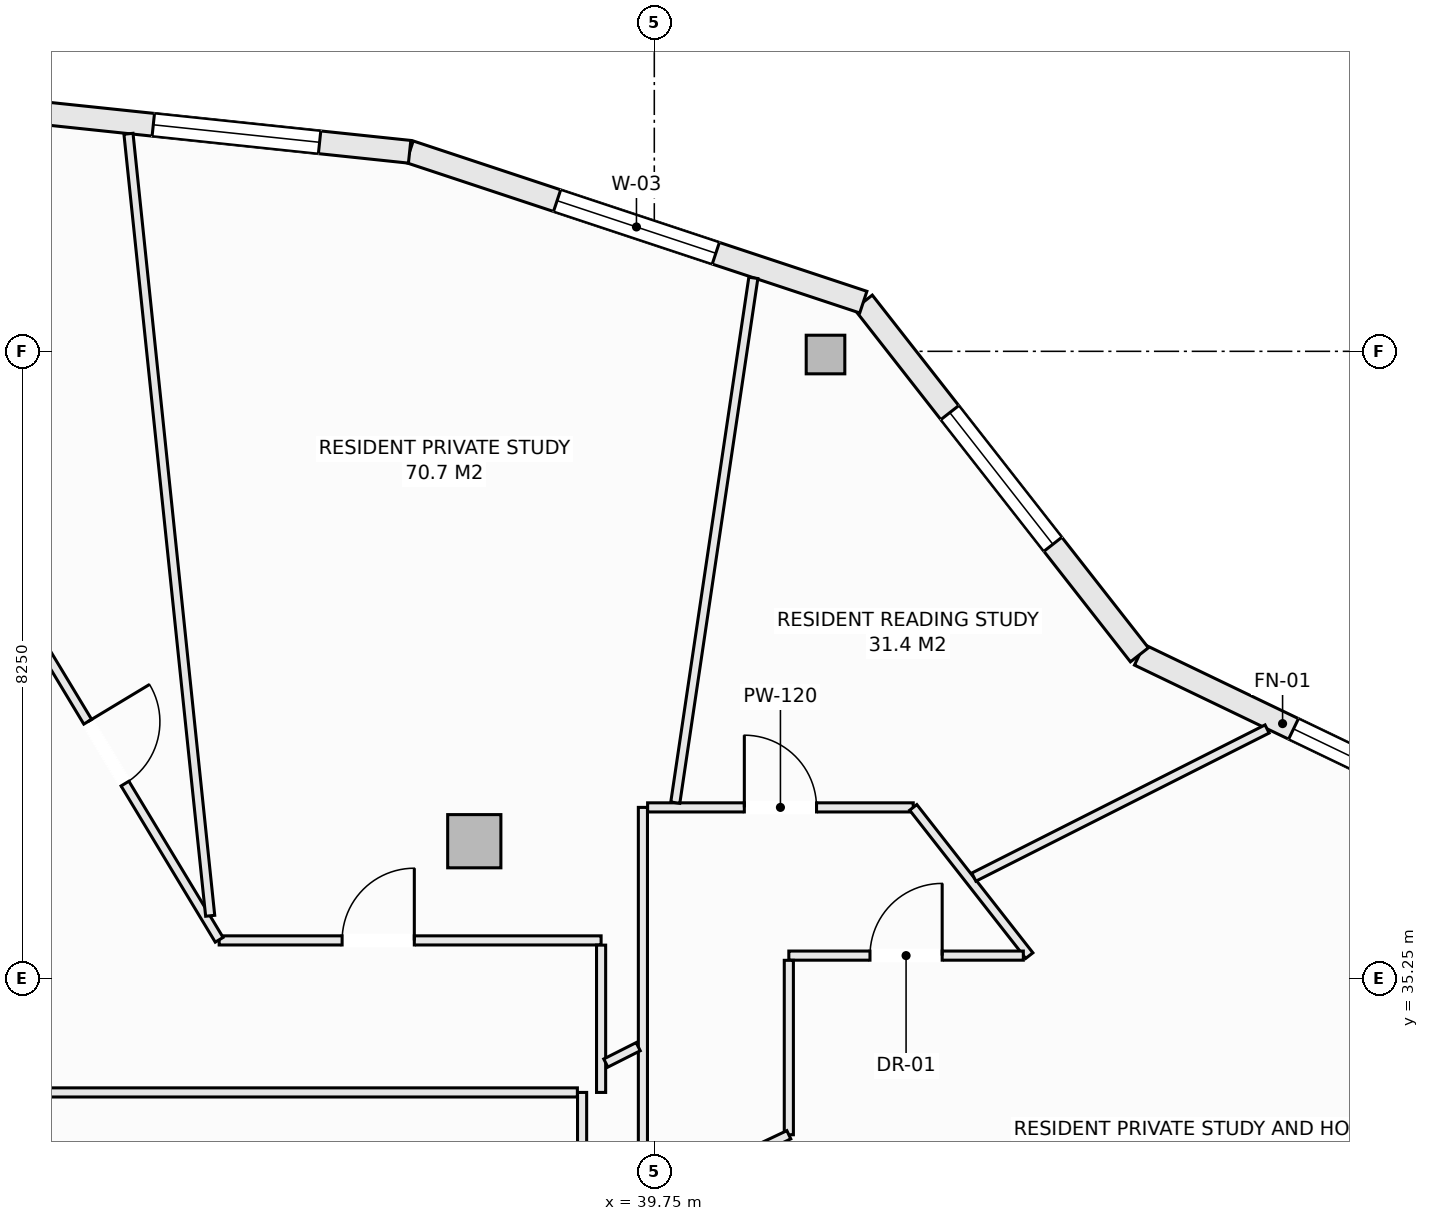
"""IFC4 building model, lengths in metres.
Left out: names, types, materials, properties, quantities, classifications, styles, units other than length and angle.
Written with IfcOpenShell. Run it as: python <this file> out.ifc"""

import sys

from ifc_helpers import new_model, si_unit, direction, frame, frame_2d, origin, origin_2d, place, context, subcontext, project, spatial, rectangle, hollow_rectangle, extrude, element, fill, save


model = new_model("IFC4")
c1 = context("Model", 3, precision=1e-05, world=origin(), true_north=direction((0.0, 1.0)))
c2 = subcontext(c1, "Body", "Model", "MODEL_VIEW")
j1 = project(units=[si_unit("LENGTHUNIT", "METRE"), si_unit("PLANEANGLEUNIT", "RADIAN")], contexts=[c1])
p1 = place(None, origin())
s1 = spatial("IfcSite", under=j1, at=p1, CompositionType="ELEMENT")
p2 = place(p1, origin())
s2 = spatial("IfcBuilding", under=s1, at=p2, CompositionType="ELEMENT")
p3 = place(p2, frame((0.0, 0.0, 229.4)))
s3 = spatial("IfcBuildingStorey", under=s2, at=p3, CompositionType="ELEMENT", Elevation=229.4)
p4 = place(p3, frame((42.003, 43.458, -0.27), z_axis=(0.0, 0.0, 1.0), x_axis=(1.0, 0.0, 0.0)))
e1 = element("IfcColumn", 1, at=p4, inside=s3, PredefinedType="COLUMN", context=c2, shape_type="SweptSolid", body=[
    extrude(hollow_rectangle(XDim=0.508, YDim=0.508, WallThickness=0.019, at=origin_2d()), origin(), (0.0, 0.0, 1.0), 3.3),
])
p5 = place(p3, frame((37.382, 37.055, -0.27), z_axis=(0.0, 0.0, 1.0), x_axis=(1.0, 0.0, 0.0)))
e2 = element("IfcColumn", 2, at=p5, inside=s3, PredefinedType="COLUMN", context=c2, shape_type="SweptSolid", body=[
    extrude(rectangle(XDim=0.7, YDim=0.7, at=origin_2d()), origin(), (0.0, 0.0, 1.0), 3.3),
])
p6 = place(p3, frame((46.133, 39.507, 0.0), z_axis=(0.0, 0.0, 1.0), x_axis=(0.901348331142, -0.433094892545, 0.0)))
e3 = element("IfcWall", 3, at=p6, inside=s3, PredefinedType="SOLIDWALL", context=c2, shape_type="SweptSolid", body=[
    extrude(rectangle(XDim=6.021, YDim=0.3, at=frame_2d((3.01, 0.0))), origin(), (0.0, 0.0, 1.0), 2.605),
])
p7 = place(p6, frame((2.25, 0.0, 0.72)))
e4 = element("IfcOpeningElement", 4, at=p7, cuts=e3, PredefinedType="OPENING", context=c2, shape_type="SweptSolid", body=[
    extrude(rectangle(XDim=2.2, YDim=1.65, at=frame_2d((1.1, 0.825))), frame((0.0, 0.16, 0.0), z_axis=(0.0, -1.0, 0.0), x_axis=(1.0, 0.0, 0.0)), (0.0, 0.0, 1.0), 0.32),
])
p8 = place(p3, frame((42.5, 44.147, 0.0), z_axis=(0.0, 0.0, 1.0), x_axis=(0.616450126935, -0.787393955401, 0.0)))
e5 = element("IfcWall", 5, at=p8, inside=s3, PredefinedType="SOLIDWALL", context=c2, shape_type="SweptSolid", body=[
    extrude(rectangle(XDim=5.893, YDim=0.3, at=frame_2d((2.946, 0.0))), origin(), (0.0, 0.0, 1.0), 2.605),
])
p9 = place(p8, frame((1.846, 0.0, 0.72)))
e6 = element("IfcOpeningElement", 6, at=p9, cuts=e5, PredefinedType="OPENING", context=c2, shape_type="SweptSolid", body=[
    extrude(rectangle(XDim=2.2, YDim=1.65, at=frame_2d((1.1, 0.825))), frame((0.0, 0.16, 0.0), z_axis=(0.0, -1.0, 0.0), x_axis=(1.0, 0.0, 0.0)), (0.0, 0.0, 1.0), 0.32),
])
p10 = place(p3, frame((36.531, 46.125, 0.0), z_axis=(0.0, 0.0, 1.0), x_axis=(0.949240877604, -0.314550085495, 0.0)))
e7 = element("IfcWall", 7, at=p10, inside=s3, PredefinedType="SOLIDWALL", context=c2, shape_type="SweptSolid", body=[
    extrude(rectangle(XDim=6.288, YDim=0.3, at=frame_2d((3.144, 0.0))), origin(), (0.0, 0.0, 1.0), 2.605),
])
p11 = place(p10, frame((2.044, 0.0, 0.72)))
e8 = element("IfcOpeningElement", 8, at=p11, cuts=e7, PredefinedType="OPENING", context=c2, shape_type="SweptSolid", body=[
    extrude(rectangle(XDim=2.2, YDim=1.65, at=frame_2d((1.1, 0.825))), frame((0.0, 0.16, 0.0), z_axis=(0.0, -1.0, 0.0), x_axis=(1.0, 0.0, 0.0)), (0.0, 0.0, 1.0), 0.32),
])
p12 = place(p3, frame((30.125, 46.8, 0.0), z_axis=(0.0, 0.0, 1.0), x_axis=(0.994497142298, -0.104763705363, 0.0)))
e9 = element("IfcWall", 9, at=p12, inside=s3, PredefinedType="SOLIDWALL", context=c2, shape_type="SweptSolid", body=[
    extrude(rectangle(XDim=6.441, YDim=0.3, at=frame_2d((3.221, 0.0))), origin(), (0.0, 0.0, 1.0), 2.605),
])
p13 = place(p12, frame((3.05, 0.0, 0.72)))
e10 = element("IfcOpeningElement", 10, at=p13, cuts=e9, PredefinedType="OPENING", context=c2, shape_type="SweptSolid", body=[
    extrude(rectangle(XDim=2.2, YDim=1.65, at=frame_2d((1.1, 0.825))), frame((0.0, 0.16, 0.0), z_axis=(0.0, -1.0, 0.0), x_axis=(1.0, 0.0, 0.0)), (0.0, 0.0, 1.0), 0.32),
])
p14 = place(p3, frame((38.8, 31.12, 0.0), z_axis=(0.0, 0.0, 1.0), x_axis=(0.0, 1.0, 0.0)))
e11 = element("IfcWall", 11, at=p14, inside=s3, PredefinedType="PARTITIONING", context=c2, shape_type="SweptSolid", body=[
    extrude(rectangle(XDim=2.63, YDim=0.12, at=frame_2d((1.315, 0.0))), origin(), (0.0, 0.0, 1.0), 3.03),
])
p15 = place(p3, frame((30.062, 33.75, 0.0), z_axis=(0.0, 0.0, 1.0), x_axis=(1.0, 0.0, 0.0)))
e12 = element("IfcWall", 12, at=p15, inside=s3, PredefinedType="PARTITIONING", context=c2, shape_type="SweptSolid", body=[
    extrude(rectangle(XDim=8.676, YDim=0.12, at=frame_2d((4.338, 0.0))), origin(), (0.0, 0.0, 1.0), 3.03),
])
p16 = place(p3, frame((34.025, 35.75, 0.0), z_axis=(0.0, 0.0, 1.0), x_axis=(1.0, 0.0, 0.0)))
e13 = element("IfcWall", 13, at=p16, inside=s3, PredefinedType="PARTITIONING", context=c2, shape_type="SweptSolid", body=[
    extrude(rectangle(XDim=5.025, YDim=0.12, at=frame_2d((2.513, 0.0))), origin(), (0.0, 0.0, 1.0), 2.478),
])
p17 = place(p16, frame((1.617, 0.0, 0.0)))
e14 = element("IfcOpeningElement", 14, at=p17, cuts=e13, PredefinedType="OPENING", context=c2, shape_type="SweptSolid", body=[
    extrude(rectangle(XDim=0.95, YDim=2.1, at=frame_2d((0.475, 1.05))), frame((0.0, 0.07, 0.0), z_axis=(0.0, -1.0, 0.0), x_axis=(1.0, 0.0, 0.0)), (0.0, 0.0, 1.0), 0.14),
])
p18 = place(p3, frame((31.635, 39.723, 0.0), z_axis=(0.0, 0.0, 1.0), x_axis=(0.516340331217, -0.856383478565, 0.0)))
e15 = element("IfcWall", 15, at=p18, inside=s3, PredefinedType="PARTITIONING", context=c2, shape_type="SweptSolid", body=[
    extrude(rectangle(XDim=4.629, YDim=0.12, at=frame_2d((2.315, 0.0))), origin(), (0.0, 0.0, 1.0), 3.03),
])
p19 = place(p18, frame((1.28, 0.0, 0.0)))
e16 = element("IfcOpeningElement", 16, at=p19, cuts=e15, PredefinedType="OPENING", context=c2, shape_type="SweptSolid", body=[
    extrude(rectangle(XDim=0.95, YDim=2.1, at=frame_2d((0.475, 1.05))), frame((0.0, 0.07, 0.0), z_axis=(0.0, -1.0, 0.0), x_axis=(1.0, 0.0, 0.0)), (0.0, 0.0, 1.0), 0.14),
])
p20 = place(p3, frame((39.05, 33.75, 0.0), z_axis=(0.0, 0.0, 1.0), x_axis=(0.0, 1.0, 0.0)))
e17 = element("IfcWall", 17, at=p20, inside=s3, PredefinedType="PARTITIONING", context=c2, shape_type="SweptSolid", body=[
    extrude(rectangle(XDim=1.938, YDim=0.12, at=frame_2d((0.969, 0.0))), origin(), (0.0, 0.0, 1.0), 3.03),
])
p21 = place(p3, frame((39.6, 31.182, 0.0), z_axis=(0.0, 0.0, 1.0), x_axis=(0.0, 1.0, 0.0)))
e18 = element("IfcWall", 18, at=p21, inside=s3, PredefinedType="PARTITIONING", context=c2, shape_type="SweptSolid", body=[
    extrude(rectangle(XDim=6.318, YDim=0.12, at=frame_2d((3.159, 0.0))), origin(), (0.0, 0.0, 1.0), 3.03),
])
p22 = place(p3, frame((39.662, 37.5, 0.0), z_axis=(0.0, 0.0, 1.0), x_axis=(1.0, 0.0, 0.0)))
e19 = element("IfcWall", 19, at=p22, inside=s3, PredefinedType="PARTITIONING", context=c2, shape_type="SweptSolid", body=[
    extrude(rectangle(XDim=3.495, YDim=0.12, at=frame_2d((1.748, 0.0))), origin(), (0.0, 0.0, 1.0), 2.77),
])
p23 = place(p22, frame((1.272, 0.0, 0.0)))
e20 = element("IfcOpeningElement", 20, at=p23, cuts=e19, PredefinedType="OPENING", context=c2, shape_type="SweptSolid", body=[
    extrude(rectangle(XDim=0.95, YDim=2.1, at=frame_2d((0.475, 1.05))), frame((0.0, 0.07, 0.0), z_axis=(0.0, -1.0, 0.0), x_axis=(1.0, 0.0, 0.0)), (0.0, 0.0, 1.0), 0.14),
])
p24 = place(p3, frame((43.157, 37.5, 0.0), z_axis=(0.0, 0.0, 1.0), x_axis=(0.616571357052, -0.78729902938, 0.0)))
e21 = element("IfcWall", 21, at=p24, inside=s3, PredefinedType="PARTITIONING", context=c2, shape_type="SweptSolid", body=[
    extrude(rectangle(XDim=2.477, YDim=0.12, at=frame_2d((1.238, 0.0))), origin(), (0.0, 0.0, 1.0), 3.03),
])
p25 = place(p3, frame((41.52, 35.55, 0.0), z_axis=(0.0, 0.0, 1.0), x_axis=(1.0, 0.0, 0.0)))
e22 = element("IfcWall", 22, at=p25, inside=s3, PredefinedType="PARTITIONING", context=c2, shape_type="SweptSolid", body=[
    extrude(rectangle(XDim=3.085, YDim=0.12, at=frame_2d((1.542, 0.0))), origin(), (0.0, 0.0, 1.0), 3.03),
])
p26 = place(p25, frame((1.068, 0.0, 0.0)))
e23 = element("IfcOpeningElement", 23, at=p26, cuts=e22, PredefinedType="OPENING", context=c2, shape_type="SweptSolid", body=[
    extrude(rectangle(XDim=0.95, YDim=2.1, at=frame_2d((0.475, 1.05))), frame((0.0, 0.07, 0.0), z_axis=(0.0, -1.0, 0.0), x_axis=(1.0, 0.0, 0.0)), (0.0, 0.0, 1.0), 0.14),
])
p27 = place(p3, frame((41.52, 33.193, 0.0), z_axis=(0.0, 0.0, 1.0), x_axis=(0.0, 1.0, 0.0)))
e24 = element("IfcWall", 24, at=p27, inside=s3, PredefinedType="PARTITIONING", context=c2, shape_type="SweptSolid", body=[
    extrude(rectangle(XDim=2.295, YDim=0.12, at=frame_2d((1.147, 0.0))), origin(), (0.0, 0.0, 1.0), 3.03),
])
p28 = place(p3, frame((40.986, 32.94, 0.0), z_axis=(0.0, 0.0, 1.0), x_axis=(0.90356951601, 0.428441512621, 0.0)))
e25 = element("IfcWall", 25, at=p28, inside=s3, PredefinedType="PARTITIONING", context=c2, shape_type="SweptSolid", body=[
    extrude(rectangle(XDim=0.591, YDim=0.12, at=frame_2d((0.295, 0.0))), origin(), (0.0, 0.0, 1.0), 3.03),
])
p29 = place(p3, frame((39.112, 34.137, 0.0), z_axis=(0.0, 0.0, 1.0), x_axis=(0.892681104984, 0.450688855869, 0.0)))
e26 = element("IfcWall", 26, at=p29, inside=s3, PredefinedType="PARTITIONING", context=c2, shape_type="SweptSolid", body=[
    extrude(rectangle(XDim=0.477, YDim=0.12, at=frame_2d((0.239, 0.0))), origin(), (0.0, 0.0, 1.0), 3.03),
])
p30 = place(p3, frame((43.954, 36.583, 0.0), z_axis=(0.0, 0.0, 1.0), x_axis=(0.892589792595, 0.450869673139, 0.0)))
e27 = element("IfcWall", 27, at=p30, inside=s3, PredefinedType="PARTITIONING", context=c2, shape_type="SweptSolid", body=[
    extrude(rectangle(XDim=4.323, YDim=0.12, at=frame_2d((2.161, 0.0))), origin(), (0.0, 0.0, 1.0), 3.03),
])
p31 = place(p3, frame((40.026, 37.562, 0.0), z_axis=(0.0, 0.0, 1.0), x_axis=(0.147138038827, 0.989115967685, 0.0)))
e28 = element("IfcWall", 28, at=p31, inside=s3, PredefinedType="PARTITIONING", context=c2, shape_type="SweptSolid", body=[
    extrude(rectangle(XDim=6.98, YDim=0.12, at=frame_2d((3.49, 0.0))), origin(), (0.0, 0.0, 1.0), 2.478),
])
p32 = place(p3, frame((32.832, 46.362, 0.0), z_axis=(0.0, 0.0, 1.0), x_axis=(0.103942686354, -0.994583288595, 0.0)))
e29 = element("IfcWall", 29, at=p32, inside=s3, PredefinedType="PARTITIONING", context=c2, shape_type="SweptSolid", body=[
    extrude(rectangle(XDim=10.344, YDim=0.12, at=frame_2d((5.172, 0.0))), origin(), (0.0, 0.0, 1.0), 2.77),
])
p33 = place(p7, origin())
e30 = element("IfcWindow", 30, at=p33, inside=s3, PartitioningType="SINGLE_PANEL", PredefinedType="WINDOW", context=c2, shape_type="SweptSolid", body=[
    extrude(rectangle(XDim=2.2, YDim=1.65, at=frame_2d((1.1, 0.825))), frame((0.0, 0.03, 0.0), z_axis=(0.0, -1.0, 0.0), x_axis=(1.0, 0.0, 0.0)), (0.0, 0.0, 1.0), 0.06),
])
fill(e4, e30)
p34 = place(p9, origin())
e31 = element("IfcWindow", 31, at=p34, inside=s3, PartitioningType="SINGLE_PANEL", PredefinedType="WINDOW", context=c2, shape_type="SweptSolid", body=[
    extrude(rectangle(XDim=2.2, YDim=1.65, at=frame_2d((1.1, 0.825))), frame((0.0, 0.03, 0.0), z_axis=(0.0, -1.0, 0.0), x_axis=(1.0, 0.0, 0.0)), (0.0, 0.0, 1.0), 0.06),
])
fill(e6, e31)
p35 = place(p11, origin())
e32 = element("IfcWindow", 32, at=p35, inside=s3, PartitioningType="SINGLE_PANEL", PredefinedType="WINDOW", context=c2, shape_type="SweptSolid", body=[
    extrude(rectangle(XDim=2.2, YDim=1.65, at=frame_2d((1.1, 0.825))), frame((0.0, 0.03, 0.0), z_axis=(0.0, -1.0, 0.0), x_axis=(1.0, 0.0, 0.0)), (0.0, 0.0, 1.0), 0.06),
])
fill(e8, e32)
p36 = place(p13, origin())
e33 = element("IfcWindow", 33, at=p36, inside=s3, PartitioningType="SINGLE_PANEL", PredefinedType="WINDOW", context=c2, shape_type="SweptSolid", body=[
    extrude(rectangle(XDim=2.2, YDim=1.65, at=frame_2d((1.1, 0.825))), frame((0.0, 0.03, 0.0), z_axis=(0.0, -1.0, 0.0), x_axis=(1.0, 0.0, 0.0)), (0.0, 0.0, 1.0), 0.06),
])
fill(e10, e33)
p37 = place(p26, origin())
e34 = element("IfcDoor", 34, at=p37, inside=s3, OperationType="SINGLE_SWING_RIGHT", PredefinedType="DOOR", context=c2, shape_type="SweptSolid", body=[
    extrude(rectangle(XDim=0.95, YDim=2.1, at=frame_2d((0.475, 1.05))), frame((0.0, 0.025, 0.0), z_axis=(0.0, -1.0, 0.0), x_axis=(1.0, 0.0, 0.0)), (0.0, 0.0, 1.0), 0.05),
])
fill(e23, e34)
p38 = place(p23, origin())
e35 = element("IfcDoor", 35, at=p38, inside=s3, OperationType="SINGLE_SWING_LEFT", PredefinedType="DOOR", context=c2, shape_type="SweptSolid", body=[
    extrude(rectangle(XDim=0.95, YDim=2.1, at=frame_2d((0.475, 1.05))), frame((0.0, 0.025, 0.0), z_axis=(0.0, -1.0, 0.0), x_axis=(1.0, 0.0, 0.0)), (0.0, 0.0, 1.0), 0.05),
])
fill(e20, e35)
p39 = place(p17, origin())
e36 = element("IfcDoor", 36, at=p39, inside=s3, OperationType="SINGLE_SWING_RIGHT", PredefinedType="DOOR", context=c2, shape_type="SweptSolid", body=[
    extrude(rectangle(XDim=0.95, YDim=2.1, at=frame_2d((0.475, 1.05))), frame((0.0, 0.025, 0.0), z_axis=(0.0, -1.0, 0.0), x_axis=(1.0, 0.0, 0.0)), (0.0, 0.0, 1.0), 0.05),
])
fill(e14, e36)
p40 = place(p19, origin())
e37 = element("IfcDoor", 37, at=p40, inside=s3, OperationType="SINGLE_SWING_LEFT", PredefinedType="DOOR", context=c2, shape_type="SweptSolid", body=[
    extrude(rectangle(XDim=0.95, YDim=2.1, at=frame_2d((0.475, 1.05))), frame((0.0, 0.025, 0.0), z_axis=(0.0, -1.0, 0.0), x_axis=(1.0, 0.0, 0.0)), (0.0, 0.0, 1.0), 0.05),
])
fill(e16, e37)
save(model, sys.argv[1])
